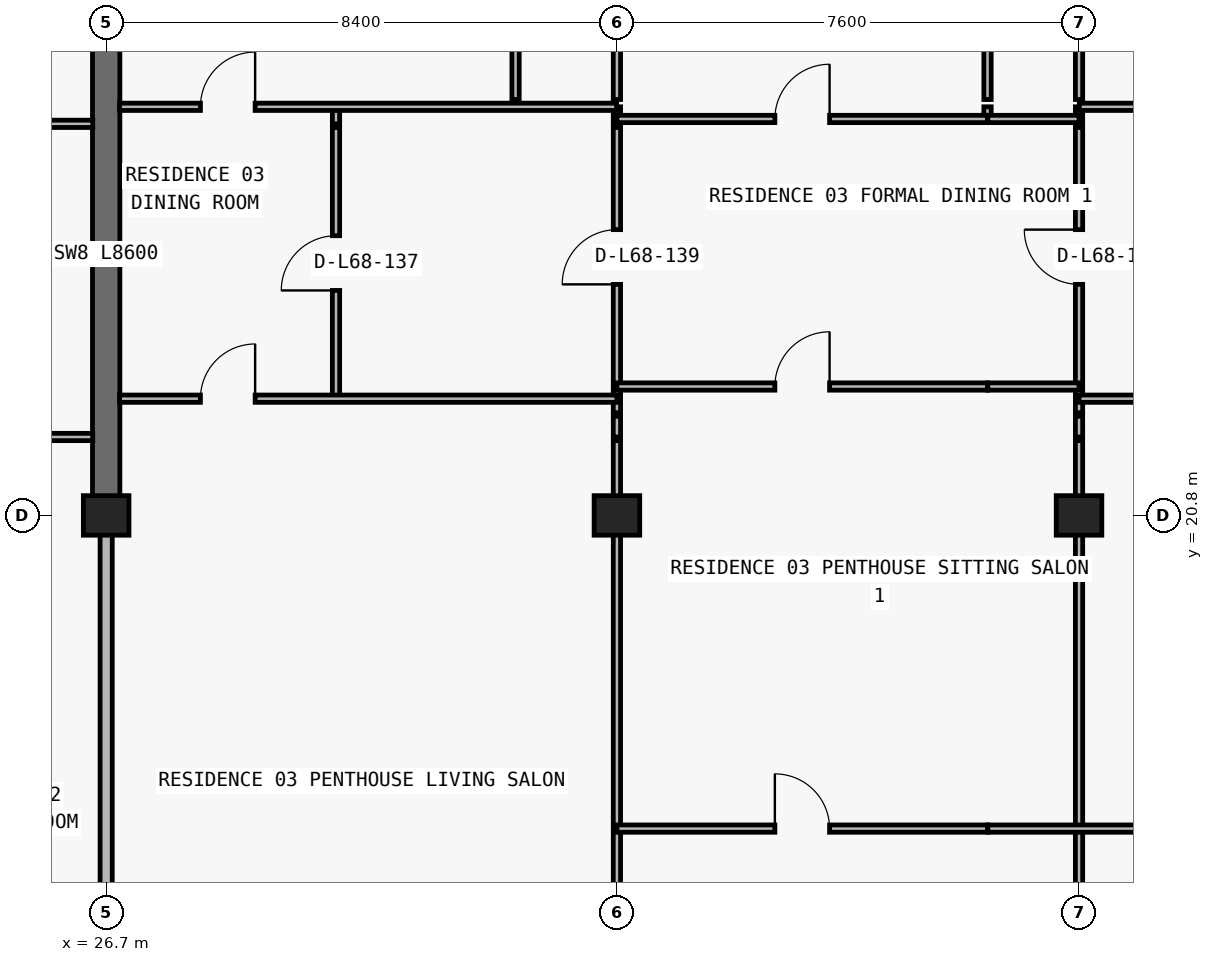
"""IFC4 building model, lengths in metres.
Left out: names, types, materials, properties, quantities, classifications, styles, units other than length and angle.
Written with IfcOpenShell. Run it as: python <this file> out.ifc"""

import sys

from ifc_helpers import new_model, si_unit, direction, frame, frame_2d, origin, origin_2d, place, context, subcontext, project, spatial, rectangle, extrude, element, fill, save


model = new_model("IFC4")
c1 = context("Model", 3, precision=1e-05, world=origin(), true_north=direction((0.0, 1.0)))
c2 = subcontext(c1, "Body", "Model", "MODEL_VIEW")
j1 = project(units=[si_unit("LENGTHUNIT", "METRE"), si_unit("PLANEANGLEUNIT", "RADIAN")], contexts=[c1])
p1 = place(None, origin())
s1 = spatial("IfcSite", under=j1, at=p1, CompositionType="ELEMENT")
p2 = place(p1, origin())
s2 = spatial("IfcBuilding", under=s1, at=p2, CompositionType="ELEMENT")
p3 = place(p2, frame((0.0, 0.0, 243.0)))
s3 = spatial("IfcBuildingStorey", under=s2, at=p3, CompositionType="ELEMENT", Elevation=243.0)
for number, where, z_axis, x_axis in (
    (1, (26.7, 20.8, 0.0), (0.0, 0.0, 1.0), (1.0, 0.0, 0.0)),
    (2, (35.1, 20.8, 0.0), (0.0, 0.0, 1.0), (1.0, 0.0, 0.0)),
    (3, (42.7, 20.8, 0.0), (0.0, 0.0, 1.0), (1.0, 0.0, 0.0)),
):
    element("IfcColumn", number, at=place(p3, frame(where, z_axis=z_axis, x_axis=x_axis)), inside=s3, PredefinedType="COLUMN", context=c2, shape_type="SweptSolid", body=[
        extrude(rectangle(XDim=0.75, YDim=0.65, at=origin_2d()), origin(), (0.0, 0.0, 1.0), 3.05),
    ])
p4 = place(p3, frame((26.7, 20.8, 0.0), z_axis=(0.0, 0.0, 1.0), x_axis=(0.0, 1.0, 0.0)))
e4 = element("IfcWall", 4, at=p4, inside=s3, PredefinedType="SHEAR", context=c2, shape_type="SweptSolid", body=[
    extrude(rectangle(XDim=8.6, YDim=0.45, at=frame_2d((4.3, 0.0))), origin(), (0.0, 0.0, 1.0), 3.05),
])
p5 = place(p3, frame((26.7, 13.34, 0.0), z_axis=(0.0, 0.0, 1.0), x_axis=(0.0, 1.0, 0.0)))
e5 = element("IfcWall", 5, at=p5, inside=s3, PredefinedType="PARTITIONING", context=c2, shape_type="SweptSolid", body=[
    extrude(rectangle(XDim=7.455, YDim=0.2, at=frame_2d((3.728, 0.0))), origin(), (0.0, 0.0, 1.0), 2.263),
])
p6 = place(p3, frame((30.48, 22.72, 0.0), z_axis=(0.0, 0.0, 1.0), x_axis=(0.0, 1.0, 0.0)))
e6 = element("IfcWall", 6, at=p6, inside=s3, PredefinedType="PARTITIONING", context=c2, shape_type="SweptSolid", body=[
    extrude(rectangle(XDim=4.46, YDim=0.12, at=frame_2d((2.23, 0.0))), origin(), (0.0, 0.0, 1.0), 3.05),
])
p7 = place(p6, frame((1.78, 0.0, 0.0)))
e7 = element("IfcOpeningElement", 7, at=p7, cuts=e6, PredefinedType="OPENING", context=c2, shape_type="SweptSolid", body=[
    extrude(rectangle(XDim=0.9, YDim=2.15, at=frame_2d((0.45, 1.075))), frame((0.0, 0.07, 0.0), z_axis=(0.0, -1.0, 0.0), x_axis=(1.0, 0.0, 0.0)), (0.0, 0.0, 1.0), 0.14),
])
p8 = place(p3, frame((30.48, 27.24, 0.0), z_axis=(0.0, 0.0, 1.0), x_axis=(0.0, 1.0, 0.0)))
e8 = element("IfcWall", 8, at=p8, inside=s3, PredefinedType="PARTITIONING", context=c2, shape_type="SweptSolid", body=[
    extrude(rectangle(XDim=0.28, YDim=0.12, at=frame_2d((0.14, 0.0))), origin(), (0.0, 0.0, 1.0), 3.05),
])
p9 = place(p3, frame((33.433, 27.64, 0.0), z_axis=(0.0, 0.0, 1.0), x_axis=(0.0, 1.0, 0.0)))
e9 = element("IfcWall", 9, at=p9, inside=s3, PredefinedType="PARTITIONING", context=c2, shape_type="SweptSolid", body=[
    extrude(rectangle(XDim=6.06, YDim=0.12, at=frame_2d((3.03, 0.0))), origin(), (0.0, 0.0, 1.0), 3.05),
])
p10 = place(p9, frame((2.605, 0.0, 0.0)))
e10 = element("IfcOpeningElement", 10, at=p10, cuts=e9, PredefinedType="OPENING", context=c2, shape_type="SweptSolid", body=[
    extrude(rectangle(XDim=0.85, YDim=2.1, at=frame_2d((0.425, 1.05))), frame((0.0, 0.07, 0.0), z_axis=(0.0, -1.0, 0.0), x_axis=(1.0, 0.0, 0.0)), (0.0, 0.0, 1.0), 0.14),
])
p11 = place(p3, frame((35.1, 13.34, 0.0), z_axis=(0.0, 0.0, 1.0), x_axis=(0.0, 1.0, 0.0)))
e11 = element("IfcWall", 11, at=p11, inside=s3, PredefinedType="PARTITIONING", context=c2, shape_type="SweptSolid", body=[
    extrude(rectangle(XDim=8.69, YDim=0.12, at=frame_2d((4.345, 0.0))), origin(), (0.0, 0.0, 1.0), 2.263),
])
p12 = place(p3, frame((35.1, 22.09, 0.0), z_axis=(0.0, 0.0, 1.0), x_axis=(0.0, 1.0, 0.0)))
e12 = element("IfcWall", 12, at=p12, inside=s3, PredefinedType="PARTITIONING", context=c2, shape_type="SweptSolid", body=[
    extrude(rectangle(XDim=0.34, YDim=0.12, at=frame_2d((0.17, 0.0))), origin(), (0.0, 0.0, 1.0), 2.263),
])
p13 = place(p3, frame((35.1, 22.49, 0.0), z_axis=(0.0, 0.0, 1.0), x_axis=(0.0, 1.0, 0.0)))
e13 = element("IfcWall", 13, at=p13, inside=s3, PredefinedType="PARTITIONING", context=c2, shape_type="SweptSolid", body=[
    extrude(rectangle(XDim=4.69, YDim=0.12, at=frame_2d((2.345, 0.0))), origin(), (0.0, 0.0, 1.0), 2.263),
])
p14 = place(p13, frame((2.11, 0.0, 0.0)))
e14 = element("IfcOpeningElement", 14, at=p14, cuts=e13, PredefinedType="OPENING", context=c2, shape_type="SweptSolid", body=[
    extrude(rectangle(XDim=0.9, YDim=2.15, at=frame_2d((0.45, 1.075))), frame((0.0, 0.07, 0.0), z_axis=(0.0, -1.0, 0.0), x_axis=(1.0, 0.0, 0.0)), (0.0, 0.0, 1.0), 0.14),
])
p15 = place(p3, frame((35.1, 27.24, 0.0), z_axis=(0.0, 0.0, 1.0), x_axis=(0.0, 1.0, 0.0)))
e15 = element("IfcWall", 15, at=p15, inside=s3, PredefinedType="PARTITIONING", context=c2, shape_type="SweptSolid", body=[
    extrude(rectangle(XDim=0.28, YDim=0.12, at=frame_2d((0.14, 0.0))), origin(), (0.0, 0.0, 1.0), 2.263),
])
p16 = place(p3, frame((35.1, 27.64, 0.0), z_axis=(0.0, 0.0, 1.0), x_axis=(0.0, 1.0, 0.0)))
e16 = element("IfcWall", 16, at=p16, inside=s3, PredefinedType="PARTITIONING", context=c2, shape_type="SweptSolid", body=[
    extrude(rectangle(XDim=6.06, YDim=0.12, at=frame_2d((3.03, 0.0))), origin(), (0.0, 0.0, 1.0), 2.263),
])
p17 = place(p3, frame((41.195, 27.32, 0.0), z_axis=(0.0, 0.0, 1.0), x_axis=(0.0, 1.0, 0.0)))
e17 = element("IfcWall", 17, at=p17, inside=s3, PredefinedType="PARTITIONING", context=c2, shape_type="SweptSolid", body=[
    extrude(rectangle(XDim=0.2, YDim=0.12, at=frame_2d((0.1, 0.0))), origin(), (0.0, 0.0, 1.0), 3.05),
])
p18 = place(p3, frame((41.195, 27.64, 0.0), z_axis=(0.0, 0.0, 1.0), x_axis=(0.0, 1.0, 0.0)))
e18 = element("IfcWall", 18, at=p18, inside=s3, PredefinedType="PARTITIONING", context=c2, shape_type="SweptSolid", body=[
    extrude(rectangle(XDim=6.06, YDim=0.12, at=frame_2d((3.03, 0.0))), origin(), (0.0, 0.0, 1.0), 3.05),
])
p19 = place(p18, frame((2.605, 0.0, 0.0)))
e19 = element("IfcOpeningElement", 19, at=p19, cuts=e18, PredefinedType="OPENING", context=c2, shape_type="SweptSolid", body=[
    extrude(rectangle(XDim=0.85, YDim=2.1, at=frame_2d((0.425, 1.05))), frame((0.0, 0.07, 0.0), z_axis=(0.0, -1.0, 0.0), x_axis=(1.0, 0.0, 0.0)), (0.0, 0.0, 1.0), 0.14),
])
p20 = place(p3, frame((42.7, 13.34, 0.0), z_axis=(0.0, 0.0, 1.0), x_axis=(0.0, 1.0, 0.0)))
e20 = element("IfcWall", 20, at=p20, inside=s3, PredefinedType="PARTITIONING", context=c2, shape_type="SweptSolid", body=[
    extrude(rectangle(XDim=8.69, YDim=0.12, at=frame_2d((4.345, 0.0))), origin(), (0.0, 0.0, 1.0), 2.263),
])
p21 = place(p3, frame((42.7, 22.09, 0.0), z_axis=(0.0, 0.0, 1.0), x_axis=(0.0, 1.0, 0.0)))
e21 = element("IfcWall", 21, at=p21, inside=s3, PredefinedType="PARTITIONING", context=c2, shape_type="SweptSolid", body=[
    extrude(rectangle(XDim=0.34, YDim=0.12, at=frame_2d((0.17, 0.0))), origin(), (0.0, 0.0, 1.0), 2.263),
])
p22 = place(p3, frame((42.7, 22.49, 0.0), z_axis=(0.0, 0.0, 1.0), x_axis=(0.0, 1.0, 0.0)))
e22 = element("IfcWall", 22, at=p22, inside=s3, PredefinedType="PARTITIONING", context=c2, shape_type="SweptSolid", body=[
    extrude(rectangle(XDim=4.69, YDim=0.12, at=frame_2d((2.345, 0.0))), origin(), (0.0, 0.0, 1.0), 2.263),
])
p23 = place(p22, frame((2.11, 0.0, 0.0)))
e23 = element("IfcOpeningElement", 23, at=p23, cuts=e22, PredefinedType="OPENING", context=c2, shape_type="SweptSolid", body=[
    extrude(rectangle(XDim=0.9, YDim=2.15, at=frame_2d((0.45, 1.075))), frame((0.0, 0.07, 0.0), z_axis=(0.0, -1.0, 0.0), x_axis=(1.0, 0.0, 0.0)), (0.0, 0.0, 1.0), 0.14),
])
p24 = place(p3, frame((42.7, 27.24, 0.0), z_axis=(0.0, 0.0, 1.0), x_axis=(0.0, 1.0, 0.0)))
e24 = element("IfcWall", 24, at=p24, inside=s3, PredefinedType="PARTITIONING", context=c2, shape_type="SweptSolid", body=[
    extrude(rectangle(XDim=0.28, YDim=0.12, at=frame_2d((0.14, 0.0))), origin(), (0.0, 0.0, 1.0), 2.263),
])
p25 = place(p3, frame((42.7, 27.64, 0.0), z_axis=(0.0, 0.0, 1.0), x_axis=(0.0, 1.0, 0.0)))
e25 = element("IfcWall", 25, at=p25, inside=s3, PredefinedType="PARTITIONING", context=c2, shape_type="SweptSolid", body=[
    extrude(rectangle(XDim=6.06, YDim=0.12, at=frame_2d((3.03, 0.0))), origin(), (0.0, 0.0, 1.0), 2.263),
])
p26 = place(p3, frame((35.1, 15.65, 0.0), z_axis=(0.0, 0.0, 1.0), x_axis=(1.0, 0.0, 0.0)))
e26 = element("IfcWall", 26, at=p26, inside=s3, PredefinedType="PARTITIONING", context=c2, shape_type="SweptSolid", body=[
    extrude(rectangle(XDim=6.095, YDim=0.12, at=frame_2d((3.047, 0.0))), origin(), (0.0, 0.0, 1.0), 3.05),
])
p27 = place(p26, frame((2.597, 0.0, 0.0)))
e27 = element("IfcOpeningElement", 27, at=p27, cuts=e26, PredefinedType="OPENING", context=c2, shape_type="SweptSolid", body=[
    extrude(rectangle(XDim=0.9, YDim=2.15, at=frame_2d((0.45, 1.075))), frame((0.0, 0.07, 0.0), z_axis=(0.0, -1.0, 0.0), x_axis=(1.0, 0.0, 0.0)), (0.0, 0.0, 1.0), 0.14),
])
p28 = place(p3, frame((41.2, 15.65, 0.0), z_axis=(0.0, 0.0, 1.0), x_axis=(1.0, 0.0, 0.0)))
e28 = element("IfcWall", 28, at=p28, inside=s3, PredefinedType="PARTITIONING", context=c2, shape_type="SweptSolid", body=[
    extrude(rectangle(XDim=9.9, YDim=0.12, at=frame_2d((4.95, 0.0))), origin(), (0.0, 0.0, 1.0), 3.05),
])
p29 = place(p28, frame((5.25, 0.0, 0.0)))
e29 = element("IfcOpeningElement", 29, at=p29, cuts=e28, PredefinedType="OPENING", context=c2, shape_type="SweptSolid", body=[
    extrude(rectangle(XDim=0.9, YDim=2.15, at=frame_2d((0.45, 1.075))), frame((0.0, 0.07, 0.0), z_axis=(0.0, -1.0, 0.0), x_axis=(1.0, 0.0, 0.0)), (0.0, 0.0, 1.0), 0.14),
])
p30 = place(p3, frame((18.3, 22.09, 0.0), z_axis=(0.0, 0.0, 1.0), x_axis=(1.0, 0.0, 0.0)))
e30 = element("IfcWall", 30, at=p30, inside=s3, PredefinedType="PARTITIONING", context=c2, shape_type="SweptSolid", body=[
    extrude(rectangle(XDim=8.18, YDim=0.12, at=frame_2d((4.09, 0.0))), origin(), (0.0, 0.0, 1.0), 3.05),
])
p31 = place(p30, frame((1.818, 0.0, 0.0)))
e31 = element("IfcOpeningElement", 31, at=p31, cuts=e30, PredefinedType="OPENING", context=c2, shape_type="SweptSolid", body=[
    extrude(rectangle(XDim=0.9, YDim=2.15, at=frame_2d((0.45, 1.075))), frame((0.0, 0.07, 0.0), z_axis=(0.0, -1.0, 0.0), x_axis=(1.0, 0.0, 0.0)), (0.0, 0.0, 1.0), 0.14),
])
p32 = place(p30, frame((5.95, 0.0, 0.0)))
e32 = element("IfcOpeningElement", 32, at=p32, cuts=e30, PredefinedType="OPENING", context=c2, shape_type="SweptSolid", body=[
    extrude(rectangle(XDim=0.9, YDim=2.15, at=frame_2d((0.45, 1.075))), frame((0.0, 0.07, 0.0), z_axis=(0.0, -1.0, 0.0), x_axis=(1.0, 0.0, 0.0)), (0.0, 0.0, 1.0), 0.14),
])
p33 = place(p3, frame((26.92, 22.72, 0.0), z_axis=(0.0, 0.0, 1.0), x_axis=(1.0, 0.0, 0.0)))
e33 = element("IfcWall", 33, at=p33, inside=s3, PredefinedType="PARTITIONING", context=c2, shape_type="SweptSolid", body=[
    extrude(rectangle(XDim=8.18, YDim=0.12, at=frame_2d((4.09, 0.0))), origin(), (0.0, 0.0, 1.0), 3.05),
])
p34 = place(p33, frame((1.33, 0.0, 0.0)))
e34 = element("IfcOpeningElement", 34, at=p34, cuts=e33, PredefinedType="OPENING", context=c2, shape_type="SweptSolid", body=[
    extrude(rectangle(XDim=0.9, YDim=2.15, at=frame_2d((0.45, 1.075))), frame((0.0, 0.07, 0.0), z_axis=(0.0, -1.0, 0.0), x_axis=(1.0, 0.0, 0.0)), (0.0, 0.0, 1.0), 0.14),
])
p35 = place(p3, frame((42.7, 22.72, 0.0), z_axis=(0.0, 0.0, 1.0), x_axis=(1.0, 0.0, 0.0)))
e35 = element("IfcWall", 35, at=p35, inside=s3, PredefinedType="PARTITIONING", context=c2, shape_type="SweptSolid", body=[
    extrude(rectangle(XDim=8.18, YDim=0.12, at=frame_2d((4.09, 0.0))), origin(), (0.0, 0.0, 1.0), 3.05),
])
p36 = place(p35, frame((3.64, 0.0, 0.0)))
e36 = element("IfcOpeningElement", 36, at=p36, cuts=e35, PredefinedType="OPENING", context=c2, shape_type="SweptSolid", body=[
    extrude(rectangle(XDim=0.9, YDim=2.15, at=frame_2d((0.45, 1.075))), frame((0.0, 0.07, 0.0), z_axis=(0.0, -1.0, 0.0), x_axis=(1.0, 0.0, 0.0)), (0.0, 0.0, 1.0), 0.14),
])
p37 = place(p3, frame((35.1, 22.92, 0.0), z_axis=(0.0, 0.0, 1.0), x_axis=(1.0, 0.0, 0.0)))
e37 = element("IfcWall", 37, at=p37, inside=s3, PredefinedType="PARTITIONING", context=c2, shape_type="SweptSolid", body=[
    extrude(rectangle(XDim=6.095, YDim=0.12, at=frame_2d((3.047, 0.0))), origin(), (0.0, 0.0, 1.0), 3.05),
])
p38 = place(p37, frame((2.597, 0.0, 0.0)))
e38 = element("IfcOpeningElement", 38, at=p38, cuts=e37, PredefinedType="OPENING", context=c2, shape_type="SweptSolid", body=[
    extrude(rectangle(XDim=0.9, YDim=2.15, at=frame_2d((0.45, 1.075))), frame((0.0, 0.07, 0.0), z_axis=(0.0, -1.0, 0.0), x_axis=(1.0, 0.0, 0.0)), (0.0, 0.0, 1.0), 0.14),
])
p39 = place(p3, frame((41.2, 22.92, 0.0), z_axis=(0.0, 0.0, 1.0), x_axis=(1.0, 0.0, 0.0)))
e39 = element("IfcWall", 39, at=p39, inside=s3, PredefinedType="PARTITIONING", context=c2, shape_type="SweptSolid", body=[
    extrude(rectangle(XDim=1.5, YDim=0.12, at=frame_2d((0.75, 0.0))), origin(), (0.0, 0.0, 1.0), 3.05),
])
p40 = place(p3, frame((18.3, 27.24, 0.0), z_axis=(0.0, 0.0, 1.0), x_axis=(1.0, 0.0, 0.0)))
e40 = element("IfcWall", 40, at=p40, inside=s3, PredefinedType="PARTITIONING", context=c2, shape_type="SweptSolid", body=[
    extrude(rectangle(XDim=8.18, YDim=0.12, at=frame_2d((4.09, 0.0))), origin(), (0.0, 0.0, 1.0), 3.05),
])
p41 = place(p40, frame((1.818, 0.0, 0.0)))
e41 = element("IfcOpeningElement", 41, at=p41, cuts=e40, PredefinedType="OPENING", context=c2, shape_type="SweptSolid", body=[
    extrude(rectangle(XDim=0.9, YDim=2.15, at=frame_2d((0.45, 1.075))), frame((0.0, 0.07, 0.0), z_axis=(0.0, -1.0, 0.0), x_axis=(1.0, 0.0, 0.0)), (0.0, 0.0, 1.0), 0.14),
])
p42 = place(p3, frame((35.1, 27.32, 0.0), z_axis=(0.0, 0.0, 1.0), x_axis=(1.0, 0.0, 0.0)))
e42 = element("IfcWall", 42, at=p42, inside=s3, PredefinedType="PARTITIONING", context=c2, shape_type="SweptSolid", body=[
    extrude(rectangle(XDim=6.095, YDim=0.12, at=frame_2d((3.047, 0.0))), origin(), (0.0, 0.0, 1.0), 3.05),
])
p43 = place(p42, frame((2.597, 0.0, 0.0)))
e43 = element("IfcOpeningElement", 43, at=p43, cuts=e42, PredefinedType="OPENING", context=c2, shape_type="SweptSolid", body=[
    extrude(rectangle(XDim=0.9, YDim=2.15, at=frame_2d((0.45, 1.075))), frame((0.0, 0.07, 0.0), z_axis=(0.0, -1.0, 0.0), x_axis=(1.0, 0.0, 0.0)), (0.0, 0.0, 1.0), 0.14),
])
p44 = place(p3, frame((41.2, 27.32, 0.0), z_axis=(0.0, 0.0, 1.0), x_axis=(1.0, 0.0, 0.0)))
e44 = element("IfcWall", 44, at=p44, inside=s3, PredefinedType="PARTITIONING", context=c2, shape_type="SweptSolid", body=[
    extrude(rectangle(XDim=1.5, YDim=0.12, at=frame_2d((0.75, 0.0))), origin(), (0.0, 0.0, 1.0), 3.05),
])
p45 = place(p3, frame((26.92, 27.52, 0.0), z_axis=(0.0, 0.0, 1.0), x_axis=(1.0, 0.0, 0.0)))
e45 = element("IfcWall", 45, at=p45, inside=s3, PredefinedType="PARTITIONING", context=c2, shape_type="SweptSolid", body=[
    extrude(rectangle(XDim=8.175, YDim=0.12, at=frame_2d((4.087, 0.0))), origin(), (0.0, 0.0, 1.0), 3.05),
])
p46 = place(p45, frame((1.33, 0.0, 0.0)))
e46 = element("IfcOpeningElement", 46, at=p46, cuts=e45, PredefinedType="OPENING", context=c2, shape_type="SweptSolid", body=[
    extrude(rectangle(XDim=0.9, YDim=2.15, at=frame_2d((0.45, 1.075))), frame((0.0, 0.07, 0.0), z_axis=(0.0, -1.0, 0.0), x_axis=(1.0, 0.0, 0.0)), (0.0, 0.0, 1.0), 0.14),
])
p47 = place(p3, frame((42.705, 27.52, 0.0), z_axis=(0.0, 0.0, 1.0), x_axis=(1.0, 0.0, 0.0)))
e47 = element("IfcWall", 47, at=p47, inside=s3, PredefinedType="PARTITIONING", context=c2, shape_type="SweptSolid", body=[
    extrude(rectangle(XDim=8.175, YDim=0.12, at=frame_2d((4.087, 0.0))), origin(), (0.0, 0.0, 1.0), 3.05),
])
p48 = place(p47, frame((2.93, 0.0, 0.0)))
e48 = element("IfcOpeningElement", 48, at=p48, cuts=e47, PredefinedType="OPENING", context=c2, shape_type="SweptSolid", body=[
    extrude(rectangle(XDim=0.9, YDim=2.15, at=frame_2d((0.45, 1.075))), frame((0.0, 0.07, 0.0), z_axis=(0.0, -1.0, 0.0), x_axis=(1.0, 0.0, 0.0)), (0.0, 0.0, 1.0), 0.14),
])
p49 = place(p46, origin())
e49 = element("IfcDoor", 49, at=p49, inside=s3, OperationType="SINGLE_SWING_RIGHT", PredefinedType="DOOR", context=c2, shape_type="SweptSolid", body=[
    extrude(rectangle(XDim=0.9, YDim=2.15, at=frame_2d((0.45, 1.075))), frame((0.0, 0.025, 0.0), z_axis=(0.0, -1.0, 0.0), x_axis=(1.0, 0.0, 0.0)), (0.0, 0.0, 1.0), 0.05),
])
fill(e46, e49)
p50 = place(p7, origin())
e50 = element("IfcDoor", 50, at=p50, inside=s3, OperationType="SINGLE_SWING_LEFT", PredefinedType="DOOR", context=c2, shape_type="SweptSolid", body=[
    extrude(rectangle(XDim=0.9, YDim=2.15, at=frame_2d((0.45, 1.075))), frame((0.0, 0.025, 0.0), z_axis=(0.0, -1.0, 0.0), x_axis=(1.0, 0.0, 0.0)), (0.0, 0.0, 1.0), 0.05),
])
fill(e7, e50)
p51 = place(p34, origin())
e51 = element("IfcDoor", 51, at=p51, inside=s3, OperationType="SINGLE_SWING_RIGHT", PredefinedType="DOOR", context=c2, shape_type="SweptSolid", body=[
    extrude(rectangle(XDim=0.9, YDim=2.15, at=frame_2d((0.45, 1.075))), frame((0.0, 0.025, 0.0), z_axis=(0.0, -1.0, 0.0), x_axis=(1.0, 0.0, 0.0)), (0.0, 0.0, 1.0), 0.05),
])
fill(e34, e51)
p52 = place(p14, origin())
e52 = element("IfcDoor", 52, at=p52, inside=s3, OperationType="SINGLE_SWING_LEFT", PredefinedType="DOOR", context=c2, shape_type="SweptSolid", body=[
    extrude(rectangle(XDim=0.9, YDim=2.15, at=frame_2d((0.45, 1.075))), frame((0.0, 0.025, 0.0), z_axis=(0.0, -1.0, 0.0), x_axis=(1.0, 0.0, 0.0)), (0.0, 0.0, 1.0), 0.05),
])
fill(e14, e52)
p53 = place(p43, origin())
e53 = element("IfcDoor", 53, at=p53, inside=s3, OperationType="SINGLE_SWING_RIGHT", PredefinedType="DOOR", context=c2, shape_type="SweptSolid", body=[
    extrude(rectangle(XDim=0.9, YDim=2.15, at=frame_2d((0.45, 1.075))), frame((0.0, 0.025, 0.0), z_axis=(0.0, -1.0, 0.0), x_axis=(1.0, 0.0, 0.0)), (0.0, 0.0, 1.0), 0.05),
])
fill(e43, e53)
p54 = place(p38, origin())
e54 = element("IfcDoor", 54, at=p54, inside=s3, OperationType="SINGLE_SWING_RIGHT", PredefinedType="DOOR", context=c2, shape_type="SweptSolid", body=[
    extrude(rectangle(XDim=0.9, YDim=2.15, at=frame_2d((0.45, 1.075))), frame((0.0, 0.025, 0.0), z_axis=(0.0, -1.0, 0.0), x_axis=(1.0, 0.0, 0.0)), (0.0, 0.0, 1.0), 0.05),
])
fill(e38, e54)
p55 = place(p27, origin())
e55 = element("IfcDoor", 55, at=p55, inside=s3, OperationType="SINGLE_SWING_LEFT", PredefinedType="DOOR", context=c2, shape_type="SweptSolid", body=[
    extrude(rectangle(XDim=0.9, YDim=2.15, at=frame_2d((0.45, 1.075))), frame((0.0, 0.025, 0.0), z_axis=(0.0, -1.0, 0.0), x_axis=(1.0, 0.0, 0.0)), (0.0, 0.0, 1.0), 0.05),
])
fill(e27, e55)
p56 = place(p23, origin())
e56 = element("IfcDoor", 56, at=p56, inside=s3, OperationType="SINGLE_SWING_RIGHT", PredefinedType="DOOR", context=c2, shape_type="SweptSolid", body=[
    extrude(rectangle(XDim=0.9, YDim=2.15, at=frame_2d((0.45, 1.075))), frame((0.0, 0.025, 0.0), z_axis=(0.0, -1.0, 0.0), x_axis=(1.0, 0.0, 0.0)), (0.0, 0.0, 1.0), 0.05),
])
fill(e23, e56)
save(model, sys.argv[1])
